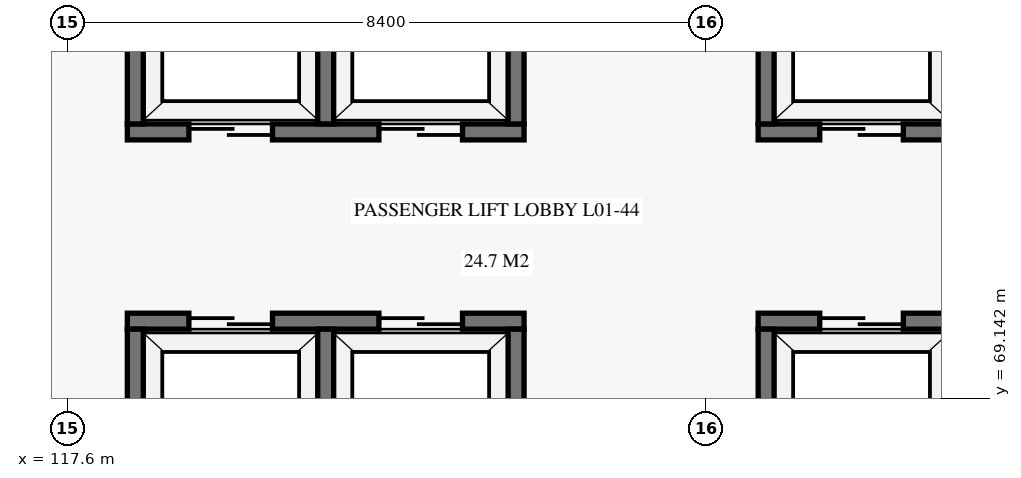
"""IFC4 building model, lengths in metres.
Left out: names, types, materials, properties, quantities, classifications, styles, units other than length and angle.
Written with IfcOpenShell. Run it as: python <this file> out.ifc"""

import sys

from ifc_helpers import new_model, si_unit, direction, frame, frame_2d, origin, place, context, subcontext, project, spatial, rectangle, extrude, element, fill, save


model = new_model("IFC4")
c1 = context("Model", 3, precision=1e-05, world=origin(), true_north=direction((0.0, 1.0)))
c2 = subcontext(c1, "Body", "Model", "MODEL_VIEW")
j1 = project(units=[si_unit("LENGTHUNIT", "METRE"), si_unit("PLANEANGLEUNIT", "RADIAN")], contexts=[c1])
p1 = place(None, origin())
s1 = spatial("IfcSite", under=j1, at=p1, CompositionType="ELEMENT")
p2 = place(p1, origin())
s2 = spatial("IfcBuilding", under=s1, at=p2, CompositionType="ELEMENT")
p3 = place(p2, origin())
s3 = spatial("IfcBuildingStorey", under=s2, at=p3, CompositionType="ELEMENT", Elevation=0.0)
p4 = place(p3, frame((126.69, 70.155, 0.0), z_axis=(0.0, 0.0, 1.0), x_axis=(1.0, 0.0, 0.0)))
e1 = element("IfcWall", 1, at=p4, inside=s3, PredefinedType="SHEAR", context=c2, shape_type="SweptSolid", body=[
    extrude(rectangle(XDim=5.22, YDim=0.21, at=frame_2d((2.61, 0.0))), origin(), (0.0, 0.0, 1.0), 5.7),
])
p5 = place(p4, frame((0.81, 0.0, 0.0)))
e2 = element("IfcOpeningElement", 2, at=p5, cuts=e1, PredefinedType="OPENING", context=c2, shape_type="SweptSolid", body=[
    extrude(rectangle(XDim=1.1, YDim=2.15, at=frame_2d((0.55, 1.075))), frame((0.0, 0.115, 0.0), z_axis=(0.0, -1.0, 0.0), x_axis=(1.0, 0.0, 0.0)), (0.0, 0.0, 1.0), 0.23),
])
p6 = place(p4, frame((3.31, 0.0, 0.0)))
e3 = element("IfcOpeningElement", 3, at=p6, cuts=e1, PredefinedType="OPENING", context=c2, shape_type="SweptSolid", body=[
    extrude(rectangle(XDim=1.1, YDim=2.15, at=frame_2d((0.55, 1.075))), frame((0.0, 0.115, 0.0), z_axis=(0.0, -1.0, 0.0), x_axis=(1.0, 0.0, 0.0)), (0.0, 0.0, 1.0), 0.23),
])
p7 = place(p3, frame((126.795, 67.85, 0.0), z_axis=(0.0, 0.0, 1.0), x_axis=(0.0, 1.0, 0.0)))
e4 = element("IfcWall", 4, at=p7, inside=s3, PredefinedType="SHEAR", context=c2, shape_type="SweptSolid", body=[
    extrude(rectangle(XDim=2.2, YDim=0.21, at=frame_2d((1.1, 0.0))), origin(), (0.0, 0.0, 1.0), 5.7),
])
p8 = place(p3, frame((126.69, 72.645, 0.0), z_axis=(0.0, 0.0, 1.0), x_axis=(1.0, 0.0, 0.0)))
e5 = element("IfcWall", 5, at=p8, inside=s3, PredefinedType="SHEAR", context=c2, shape_type="SweptSolid", body=[
    extrude(rectangle(XDim=5.22, YDim=0.21, at=frame_2d((2.61, 0.0))), origin(), (0.0, 0.0, 1.0), 5.7),
])
p9 = place(p8, frame((0.81, 0.0, 0.0)))
e6 = element("IfcOpeningElement", 6, at=p9, cuts=e5, PredefinedType="OPENING", context=c2, shape_type="SweptSolid", body=[
    extrude(rectangle(XDim=1.1, YDim=2.15, at=frame_2d((0.55, 1.075))), frame((0.0, 0.115, 0.0), z_axis=(0.0, -1.0, 0.0), x_axis=(1.0, 0.0, 0.0)), (0.0, 0.0, 1.0), 0.23),
])
p10 = place(p8, frame((3.31, 0.0, 0.0)))
e7 = element("IfcOpeningElement", 7, at=p10, cuts=e5, PredefinedType="OPENING", context=c2, shape_type="SweptSolid", body=[
    extrude(rectangle(XDim=1.1, YDim=2.15, at=frame_2d((0.55, 1.075))), frame((0.0, 0.115, 0.0), z_axis=(0.0, -1.0, 0.0), x_axis=(1.0, 0.0, 0.0)), (0.0, 0.0, 1.0), 0.23),
])
p11 = place(p3, frame((126.795, 72.75, 0.0), z_axis=(0.0, 0.0, 1.0), x_axis=(0.0, 1.0, 0.0)))
e8 = element("IfcWall", 8, at=p11, inside=s3, PredefinedType="SHEAR", context=c2, shape_type="SweptSolid", body=[
    extrude(rectangle(XDim=2.2, YDim=0.21, at=frame_2d((1.1, 0.0))), origin(), (0.0, 0.0, 1.0), 5.7),
])
p12 = place(p3, frame((118.39, 70.155, 0.0), z_axis=(0.0, 0.0, 1.0), x_axis=(1.0, 0.0, 0.0)))
e9 = element("IfcWall", 9, at=p12, inside=s3, PredefinedType="SHEAR", context=c2, shape_type="SweptSolid", body=[
    extrude(rectangle(XDim=5.22, YDim=0.21, at=frame_2d((2.61, 0.0))), origin(), (0.0, 0.0, 1.0), 5.7),
])
p13 = place(p12, frame((0.81, 0.0, 0.0)))
e10 = element("IfcOpeningElement", 10, at=p13, cuts=e9, PredefinedType="OPENING", context=c2, shape_type="SweptSolid", body=[
    extrude(rectangle(XDim=1.1, YDim=2.15, at=frame_2d((0.55, 1.075))), frame((0.0, 0.115, 0.0), z_axis=(0.0, -1.0, 0.0), x_axis=(1.0, 0.0, 0.0)), (0.0, 0.0, 1.0), 0.23),
])
p14 = place(p12, frame((3.31, 0.0, 0.0)))
e11 = element("IfcOpeningElement", 11, at=p14, cuts=e9, PredefinedType="OPENING", context=c2, shape_type="SweptSolid", body=[
    extrude(rectangle(XDim=1.1, YDim=2.15, at=frame_2d((0.55, 1.075))), frame((0.0, 0.115, 0.0), z_axis=(0.0, -1.0, 0.0), x_axis=(1.0, 0.0, 0.0)), (0.0, 0.0, 1.0), 0.23),
])
for number, where, z_axis, x_axis in (
    (12, (118.495, 67.85, 0.0), (0.0, 0.0, 1.0), (0.0, 1.0, 0.0)),
    (13, (123.505, 67.85, 0.0), (0.0, 0.0, 1.0), (0.0, 1.0, 0.0)),
    (14, (121.0, 67.85, 0.0), (0.0, 0.0, 1.0), (0.0, 1.0, 0.0)),
):
    element("IfcWall", number, at=place(p3, frame(where, z_axis=z_axis, x_axis=x_axis)), inside=s3, PredefinedType="SHEAR", context=c2, shape_type="SweptSolid", body=[
        extrude(rectangle(XDim=2.2, YDim=0.21, at=frame_2d((1.1, 0.0))), origin(), (0.0, 0.0, 1.0), 5.7),
    ])
p15 = place(p3, frame((118.39, 72.645, 0.0), z_axis=(0.0, 0.0, 1.0), x_axis=(1.0, 0.0, 0.0)))
e15 = element("IfcWall", 15, at=p15, inside=s3, PredefinedType="SHEAR", context=c2, shape_type="SweptSolid", body=[
    extrude(rectangle(XDim=5.22, YDim=0.21, at=frame_2d((2.61, 0.0))), origin(), (0.0, 0.0, 1.0), 5.7),
])
p16 = place(p15, frame((0.81, 0.0, 0.0)))
e16 = element("IfcOpeningElement", 16, at=p16, cuts=e15, PredefinedType="OPENING", context=c2, shape_type="SweptSolid", body=[
    extrude(rectangle(XDim=1.1, YDim=2.15, at=frame_2d((0.55, 1.075))), frame((0.0, 0.115, 0.0), z_axis=(0.0, -1.0, 0.0), x_axis=(1.0, 0.0, 0.0)), (0.0, 0.0, 1.0), 0.23),
])
p17 = place(p15, frame((3.31, 0.0, 0.0)))
e17 = element("IfcOpeningElement", 17, at=p17, cuts=e15, PredefinedType="OPENING", context=c2, shape_type="SweptSolid", body=[
    extrude(rectangle(XDim=1.1, YDim=2.15, at=frame_2d((0.55, 1.075))), frame((0.0, 0.115, 0.0), z_axis=(0.0, -1.0, 0.0), x_axis=(1.0, 0.0, 0.0)), (0.0, 0.0, 1.0), 0.23),
])
for number, where, z_axis, x_axis in (
    (18, (118.495, 72.75, 0.0), (0.0, 0.0, 1.0), (0.0, 1.0, 0.0)),
    (19, (123.505, 72.75, 0.0), (0.0, 0.0, 1.0), (0.0, 1.0, 0.0)),
    (20, (121.0, 72.75, 0.0), (0.0, 0.0, 1.0), (0.0, 1.0, 0.0)),
):
    element("IfcWall", number, at=place(p3, frame(where, z_axis=z_axis, x_axis=x_axis)), inside=s3, PredefinedType="SHEAR", context=c2, shape_type="SweptSolid", body=[
        extrude(rectangle(XDim=2.2, YDim=0.21, at=frame_2d((1.1, 0.0))), origin(), (0.0, 0.0, 1.0), 5.7),
    ])
p18 = place(p5, origin())
e21 = element("IfcDoor", 21, at=p18, inside=s3, OperationType="DOUBLE_DOOR_SLIDING", PredefinedType="DOOR", context=c2, shape_type="SweptSolid", body=[
    extrude(rectangle(XDim=1.1, YDim=2.15, at=frame_2d((0.55, 1.075))), frame((0.0, 0.025, 0.0), z_axis=(0.0, -1.0, 0.0), x_axis=(1.0, 0.0, 0.0)), (0.0, 0.0, 1.0), 0.05),
])
fill(e2, e21)
p19 = place(p9, origin())
e22 = element("IfcDoor", 22, at=p19, inside=s3, OperationType="DOUBLE_DOOR_SLIDING", PredefinedType="DOOR", context=c2, shape_type="SweptSolid", body=[
    extrude(rectangle(XDim=1.1, YDim=2.15, at=frame_2d((0.55, 1.075))), frame((0.0, 0.025, 0.0), z_axis=(0.0, -1.0, 0.0), x_axis=(1.0, 0.0, 0.0)), (0.0, 0.0, 1.0), 0.05),
])
fill(e6, e22)
p20 = place(p13, origin())
e23 = element("IfcDoor", 23, at=p20, inside=s3, OperationType="DOUBLE_DOOR_SLIDING", PredefinedType="DOOR", context=c2, shape_type="SweptSolid", body=[
    extrude(rectangle(XDim=1.1, YDim=2.15, at=frame_2d((0.55, 1.075))), frame((0.0, 0.025, 0.0), z_axis=(0.0, -1.0, 0.0), x_axis=(1.0, 0.0, 0.0)), (0.0, 0.0, 1.0), 0.05),
])
fill(e10, e23)
p21 = place(p14, origin())
e24 = element("IfcDoor", 24, at=p21, inside=s3, OperationType="DOUBLE_DOOR_SLIDING", PredefinedType="DOOR", context=c2, shape_type="SweptSolid", body=[
    extrude(rectangle(XDim=1.1, YDim=2.15, at=frame_2d((0.55, 1.075))), frame((0.0, 0.025, 0.0), z_axis=(0.0, -1.0, 0.0), x_axis=(1.0, 0.0, 0.0)), (0.0, 0.0, 1.0), 0.05),
])
fill(e11, e24)
p22 = place(p16, origin())
e25 = element("IfcDoor", 25, at=p22, inside=s3, OperationType="DOUBLE_DOOR_SLIDING", PredefinedType="DOOR", context=c2, shape_type="SweptSolid", body=[
    extrude(rectangle(XDim=1.1, YDim=2.15, at=frame_2d((0.55, 1.075))), frame((0.0, 0.025, 0.0), z_axis=(0.0, -1.0, 0.0), x_axis=(1.0, 0.0, 0.0)), (0.0, 0.0, 1.0), 0.05),
])
fill(e16, e25)
p23 = place(p17, origin())
e26 = element("IfcDoor", 26, at=p23, inside=s3, OperationType="DOUBLE_DOOR_SLIDING", PredefinedType="DOOR", context=c2, shape_type="SweptSolid", body=[
    extrude(rectangle(XDim=1.1, YDim=2.15, at=frame_2d((0.55, 1.075))), frame((0.0, 0.025, 0.0), z_axis=(0.0, -1.0, 0.0), x_axis=(1.0, 0.0, 0.0)), (0.0, 0.0, 1.0), 0.05),
])
fill(e17, e26)
save(model, sys.argv[1])
